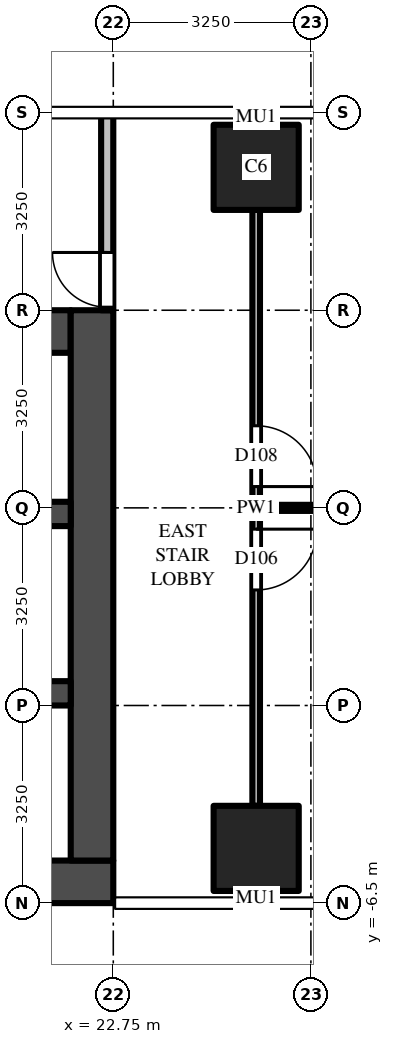
"""IFC4 building model, lengths in metres.
Left out: names, types, materials, properties, quantities, classifications, styles, units other than length and angle.
Written with IfcOpenShell. Run it as: python <this file> out.ifc"""

import sys

from ifc_helpers import new_model, si_unit, direction, frame, frame_2d, origin, origin_2d, place, context, subcontext, project, spatial, rectangle, extrude, source, transform, mapped, element, fill, save


model = new_model("IFC4")
c1 = context("Model", 3, precision=1e-05, world=origin(), true_north=direction((0.0, 1.0)))
c2 = subcontext(c1, "Body", "Model", "MODEL_VIEW")
j1 = project(units=[si_unit("LENGTHUNIT", "METRE"), si_unit("PLANEANGLEUNIT", "RADIAN")], contexts=[c1])
p1 = place(None, origin())
s1 = spatial("IfcSite", under=j1, at=p1, CompositionType="ELEMENT")
p2 = place(p1, origin())
s2 = spatial("IfcBuilding", under=s1, at=p2, CompositionType="ELEMENT")
p3 = place(p2, frame((0.0, 0.0, 65.5)))
s3 = spatial("IfcBuildingStorey", under=s2, at=p3, CompositionType="ELEMENT", Elevation=65.5)
m1 = source(origin(), c2, "Body", "SweptSolid", [
    extrude(rectangle(XDim=1.4, YDim=1.4, at=origin_2d()), origin(), (0.0, 0.0, 1.0), 4.5),
])
for number, where, z_axis, x_axis in (
    (1, (25.1, 5.6, 0.0), (0.0, 0.0, 1.0), (1.0, 0.0, 0.0)),
    (2, (25.1, -5.6, 0.0), (0.0, 0.0, 1.0), (1.0, 0.0, 0.0)),
):
    element("IfcColumn", number, at=place(p3, frame(where, z_axis=z_axis, x_axis=x_axis)), inside=s3, PredefinedType="COLUMN", context=c2, shape_type="MappedRepresentation", body=[
        mapped(m1, transform((0.0, 0.0, 0.0))),
    ])
m2 = source(origin(), c2, "Body", "SweptSolid", [
    extrude(rectangle(XDim=16.45, YDim=0.7, at=frame_2d((8.225, 0.0))), origin(), (0.0, 0.0, 1.0), 4.25),
])
p4 = place(p3, frame((6.3, -6.15, 0.0), z_axis=(0.0, 0.0, 1.0), x_axis=(1.0, 0.0, 0.0)))
e3 = element("IfcWall", 3, at=p4, inside=s3, PredefinedType="SHEAR", context=c2, shape_type="MappedRepresentation", body=[
    mapped(m2, transform((0.0, 0.0, 0.0))),
])
m3 = source(origin(), c2, "Body", "SweptSolid", [
    extrude(rectangle(XDim=14.85, YDim=0.7, at=frame_2d((7.425, 0.0))), origin(), (0.0, 0.0, 1.0), 4.25),
])
p5 = place(p3, frame((7.2, 2.9, 0.0), z_axis=(0.0, 0.0, 1.0), x_axis=(1.0, 0.0, 0.0)))
e4 = element("IfcWall", 4, at=p5, inside=s3, PredefinedType="SHEAR", context=c2, shape_type="MappedRepresentation", body=[
    mapped(m3, transform((0.0, 0.0, 0.0))),
])
m4 = source(origin(), c2, "Body", "SweptSolid", [
    extrude(rectangle(XDim=1.3, YDim=2.1, at=frame_2d((0.65, 1.05))), frame((0.0, 0.36, 0.0), z_axis=(0.0, -1.0, 0.0), x_axis=(1.0, 0.0, 0.0)), (0.0, 0.0, 1.0), 0.72),
])
p6 = place(p5, frame((12.2, 0.0, 0.0)))
e5 = element("IfcOpeningElement", 5, at=p6, cuts=e4, PredefinedType="OPENING", context=c2, shape_type="MappedRepresentation", body=[
    mapped(m4, transform((0.0, 0.0, 0.0))),
])
m5 = source(origin(), c2, "Body", "SweptSolid", [
    extrude(rectangle(XDim=1.2, YDim=2.1, at=frame_2d((0.6, 1.05))), frame((0.0, 0.36, 0.0), z_axis=(0.0, -1.0, 0.0), x_axis=(1.0, 0.0, 0.0)), (0.0, 0.0, 1.0), 0.72),
])
p7 = place(p5, frame((9.85, 0.0, 0.0)))
e6 = element("IfcOpeningElement", 6, at=p7, cuts=e4, PredefinedType="OPENING", context=c2, shape_type="MappedRepresentation", body=[
    mapped(m5, transform((0.0, 0.0, 0.0))),
])
m6 = source(origin(), c2, "Body", "SweptSolid", [
    extrude(rectangle(XDim=1.0, YDim=2.1, at=frame_2d((0.5, 1.05))), frame((0.0, 0.36, 0.0), z_axis=(0.0, -1.0, 0.0), x_axis=(1.0, 0.0, 0.0)), (0.0, 0.0, 1.0), 0.72),
])
p8 = place(p5, frame((7.9, 0.0, 0.0)))
e7 = element("IfcOpeningElement", 7, at=p8, cuts=e4, PredefinedType="OPENING", context=c2, shape_type="MappedRepresentation", body=[
    mapped(m6, transform((0.0, 0.0, 0.0))),
])
m7 = source(origin(), c2, "Body", "SweptSolid", [
    extrude(rectangle(XDim=0.9, YDim=2.1, at=frame_2d((0.45, 1.05))), frame((0.0, 0.36, 0.0), z_axis=(0.0, -1.0, 0.0), x_axis=(1.0, 0.0, 0.0)), (0.0, 0.0, 1.0), 0.72),
])
p9 = place(p5, frame((0.65, 0.0, 0.0)))
e8 = element("IfcOpeningElement", 8, at=p9, cuts=e4, PredefinedType="OPENING", context=c2, shape_type="MappedRepresentation", body=[
    mapped(m7, transform((0.0, 0.0, 0.0))),
])
p10 = place(p5, frame((3.2, 0.0, 0.0)))
e9 = element("IfcOpeningElement", 9, at=p10, cuts=e4, PredefinedType="OPENING", context=c2, shape_type="MappedRepresentation", body=[
    mapped(m6, transform((0.0, 0.0, 0.0))),
])
p11 = place(p5, frame((5.85, 0.0, 0.0)))
e10 = element("IfcOpeningElement", 10, at=p11, cuts=e4, PredefinedType="OPENING", context=c2, shape_type="MappedRepresentation", body=[
    mapped(m7, transform((0.0, 0.0, 0.0))),
])
m8 = source(origin(), c2, "Body", "SweptSolid", [
    extrude(rectangle(XDim=9.05, YDim=0.7, at=frame_2d((4.525, 0.0))), origin(), (0.0, 0.0, 1.0), 4.25),
])
p12 = place(p3, frame((22.4, -5.8, 0.0), z_axis=(0.0, 0.0, 1.0), x_axis=(0.0, 1.0, 0.0)))
e11 = element("IfcWall", 11, at=p12, inside=s3, PredefinedType="SHEAR", context=c2, shape_type="MappedRepresentation", body=[
    mapped(m8, transform((0.0, 0.0, 0.0))),
])
m9 = source(origin(), c2, "Body", "SweptSolid", [
    extrude(rectangle(XDim=14.85, YDim=0.4, at=frame_2d((7.425, 0.0))), origin(), (0.0, 0.0, 1.0), 4.25),
])
p13 = place(p3, frame((7.2, -0.1, 0.0), z_axis=(0.0, 0.0, 1.0), x_axis=(1.0, 0.0, 0.0)))
e12 = element("IfcWall", 12, at=p13, inside=s3, PredefinedType="SHEAR", context=c2, shape_type="MappedRepresentation", body=[
    mapped(m9, transform((0.0, 0.0, 0.0))),
])
m10 = source(origin(), c2, "Body", "SweptSolid", [
    extrude(rectangle(XDim=1.0, YDim=2.1, at=frame_2d((0.5, 1.05))), frame((0.0, 0.21, 0.0), z_axis=(0.0, -1.0, 0.0), x_axis=(1.0, 0.0, 0.0)), (0.0, 0.0, 1.0), 0.42),
])
p14 = place(p13, frame((7.9, 0.0, 0.0)))
e13 = element("IfcOpeningElement", 13, at=p14, cuts=e12, PredefinedType="OPENING", context=c2, shape_type="MappedRepresentation", body=[
    mapped(m10, transform((0.0, 0.0, 0.0))),
])
m11 = source(origin(), c2, "Body", "SweptSolid", [
    extrude(rectangle(XDim=5.7, YDim=0.4, at=frame_2d((2.85, 0.0))), origin(), (0.0, 0.0, 1.0), 4.25),
])
p15 = place(p3, frame((16.35, -3.05, 0.0), z_axis=(0.0, 0.0, 1.0), x_axis=(1.0, 0.0, 0.0)))
e14 = element("IfcWall", 14, at=p15, inside=s3, PredefinedType="SHEAR", context=c2, shape_type="MappedRepresentation", body=[
    mapped(m11, transform((0.0, 0.0, 0.0))),
])
m12 = source(origin(), c2, "Body", "SweptSolid", [
    extrude(rectangle(XDim=3.25, YDim=0.2, at=frame_2d((1.625, 0.0))), origin(), (0.0, 0.0, 1.0), 4.25),
])
p16 = place(p3, frame((22.65, 3.25, 0.0), z_axis=(0.0, 0.0, 1.0), x_axis=(0.0, 1.0, 0.0)))
e15 = element("IfcWall", 15, at=p16, inside=s3, PredefinedType="PARTITIONING", context=c2, shape_type="MappedRepresentation", body=[
    mapped(m12, transform((0.0, 0.0, 0.0))),
])
m13 = source(origin(), c2, "Body", "SweptSolid", [
    extrude(rectangle(XDim=0.9, YDim=2.1, at=frame_2d((0.45, 1.05))), frame((0.0, 0.11, 0.0), z_axis=(0.0, -1.0, 0.0), x_axis=(1.0, 0.0, 0.0)), (0.0, 0.0, 1.0), 0.22),
])
p17 = place(p16, frame((0.05, 0.0, 0.0)))
e16 = element("IfcOpeningElement", 16, at=p17, cuts=e15, PredefinedType="OPENING", context=c2, shape_type="MappedRepresentation", body=[
    mapped(m13, transform((0.0, 0.0, 0.0))),
])
m14 = source(origin(), c2, "Body", "SweptSolid", [
    extrude(rectangle(XDim=9.8, YDim=0.125, at=frame_2d((4.9, 0.0))), origin(), (0.0, 0.0, 1.0), 3.468),
])
p18 = place(p3, frame((25.1, 4.9, 0.0), z_axis=(0.0, 0.0, 1.0), x_axis=(0.0, -1.0, 0.0)))
e17 = element("IfcWall", 17, at=p18, inside=s3, PredefinedType="PARTITIONING", context=c2, shape_type="MappedRepresentation", body=[
    mapped(m14, transform((0.0, 0.0, 0.0))),
])
m15 = source(origin(), c2, "Body", "SweptSolid", [
    extrude(rectangle(XDim=1.0, YDim=2.1, at=frame_2d((0.5, 1.05))), frame((0.0, 0.073, 0.0), z_axis=(0.0, -1.0, 0.0), x_axis=(1.0, 0.0, 0.0)), (0.0, 0.0, 1.0), 0.145),
])
p19 = place(p18, frame((5.25, 0.0, 0.0)))
e18 = element("IfcOpeningElement", 18, at=p19, cuts=e17, PredefinedType="OPENING", context=c2, shape_type="MappedRepresentation", body=[
    mapped(m15, transform((0.0, 0.0, 0.0))),
])
p20 = place(p18, frame((3.55, 0.0, 0.0)))
e19 = element("IfcOpeningElement", 19, at=p20, cuts=e17, PredefinedType="OPENING", context=c2, shape_type="MappedRepresentation", body=[
    mapped(m15, transform((0.0, 0.0, 0.0))),
])
m16 = source(origin(), c2, "Body", "SweptSolid", [
    extrude(rectangle(XDim=7.137, YDim=0.1, at=frame_2d((3.569, 0.0))), origin(), (0.0, 0.0, 1.0), 3.33),
])
p21 = place(p3, frame((25.163, 0.0, 0.0), z_axis=(0.0, 0.0, 1.0), x_axis=(1.0, 0.0, 0.0)))
e20 = element("IfcWall", 20, at=p21, inside=s3, PredefinedType="PARTITIONING", context=c2, shape_type="MappedRepresentation", body=[
    mapped(m16, transform((0.0, 0.0, 0.0))),
])
m17 = source(origin(), c2, "Body", "SweptSolid", [
    extrude(rectangle(XDim=0.9, YDim=2.1, at=frame_2d((0.45, 1.05))), frame((0.0, 0.025, 0.0), z_axis=(0.0, -1.0, 0.0), x_axis=(1.0, 0.0, 0.0)), (0.0, 0.0, 1.0), 0.05),
])
p22 = place(p17, origin())
e21 = element("IfcDoor", 21, at=p22, inside=s3, OperationType="SINGLE_SWING_RIGHT", PredefinedType="DOOR", context=c2, shape_type="MappedRepresentation", body=[
    mapped(m17, transform((0.0, 0.0, 0.0))),
])
fill(e16, e21)
m18 = source(origin(), c2, "Body", "SweptSolid", [
    extrude(rectangle(XDim=1.0, YDim=2.1, at=frame_2d((0.5, 1.05))), frame((0.0, 0.025, 0.0), z_axis=(0.0, -1.0, 0.0), x_axis=(1.0, 0.0, 0.0)), (0.0, 0.0, 1.0), 0.05),
])
p23 = place(p19, origin())
e22 = element("IfcDoor", 22, at=p23, inside=s3, OperationType="SINGLE_SWING_LEFT", PredefinedType="DOOR", context=c2, shape_type="MappedRepresentation", body=[
    mapped(m18, transform((0.0, 0.0, 0.0))),
])
fill(e18, e22)
p24 = place(p20, origin())
e23 = element("IfcDoor", 23, at=p24, inside=s3, OperationType="SINGLE_SWING_RIGHT", PredefinedType="DOOR", context=c2, shape_type="MappedRepresentation", body=[
    mapped(m18, transform((0.0, 0.0, 0.0))),
])
fill(e19, e23)
save(model, sys.argv[1])
